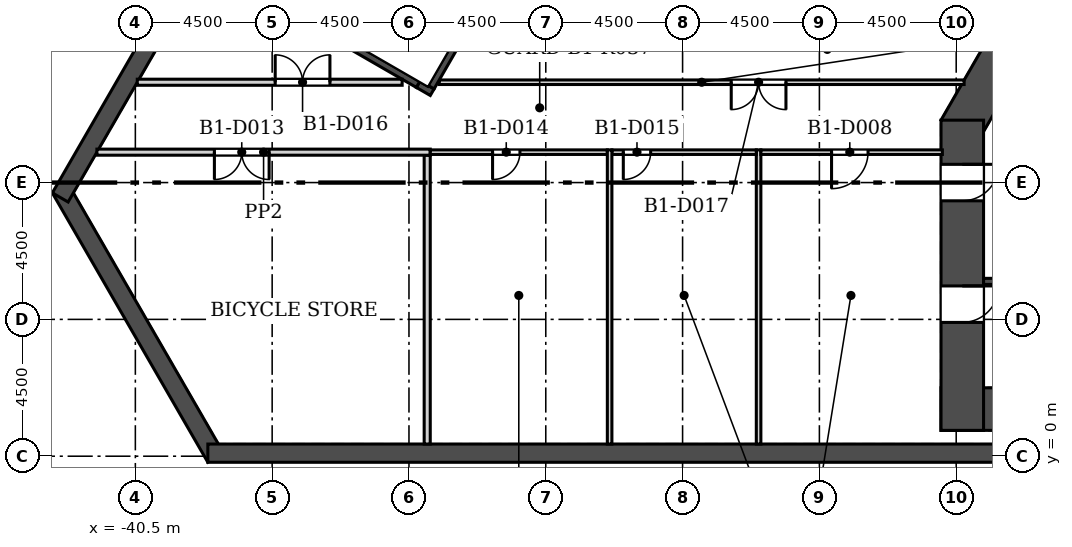
"""IFC4 building model, lengths in metres.
Left out: names, types, materials, properties, quantities, classifications, styles, units other than length and angle.
Written with IfcOpenShell. Run it as: python <this file> out.ifc"""

import sys

from ifc_helpers import new_model, si_unit, direction, frame, frame_2d, origin, place, context, subcontext, project, spatial, rectangle, extrude, element, fill, save


model = new_model("IFC4")
c1 = context("Model", 3, precision=1e-05, world=origin(), true_north=direction((0.0, 1.0)))
c2 = subcontext(c1, "Body", "Model", "MODEL_VIEW")
j1 = project(units=[si_unit("LENGTHUNIT", "METRE"), si_unit("PLANEANGLEUNIT", "RADIAN")], contexts=[c1])
p1 = place(None, origin())
s1 = spatial("IfcSite", under=j1, at=p1, CompositionType="ELEMENT")
p2 = place(p1, origin())
s2 = spatial("IfcBuilding", under=s1, at=p2, CompositionType="ELEMENT")
p3 = place(p2, frame((0.0, 0.0, -8.0)))
s3 = spatial("IfcBuildingStorey", under=s2, at=p3, CompositionType="ELEMENT", Elevation=-8.0)
p4 = place(p3, frame((-42.971, 8.81, 0.0), z_axis=(0.0, 0.0, 1.0), x_axis=(0.499996492717, -0.866027428706, 0.0)))
e1 = element("IfcWall", 1, at=p4, inside=s3, PredefinedType="SOLIDWALL", context=c2, shape_type="SweptSolid", body=[
    extrude(rectangle(XDim=10.231, YDim=0.6, at=frame_2d((5.115, 0.0))), origin(), (0.0, 0.0, 1.0), 7.6),
])
for number, where, z_axis, x_axis in (
    (2, (-38.115, 0.1, 0.0), (0.0, 0.0, 1.0), (1.0, 0.0, 0.0)),
    (3, (-4.856, 74.528, 0.0), (0.0, 0.0, 1.0), (-0.5, -0.866, 0.0)),
):
    element("IfcWall", number, at=place(p3, frame(where, z_axis=z_axis, x_axis=x_axis)), inside=s3, PredefinedType="SOLIDWALL", context=c2, shape_type="SweptSolid", body=[
        extrude(rectangle(XDim=76.231, YDim=0.6, at=frame_2d((38.115, 0.0))), origin(), (0.0, 0.0, 1.0), 7.6),
    ])
p5 = place(p3, frame((-14.0, 1.55, 0.0), z_axis=(0.0, 0.0, 1.0), x_axis=(1.0, 0.0, 0.0)))
e4 = element("IfcWall", 4, at=p5, inside=s3, PredefinedType="SHEAR", context=c2, shape_type="SweptSolid", body=[
    extrude(rectangle(XDim=28.0, YDim=1.4, at=frame_2d((14.0, 0.0))), origin(), (0.0, 0.0, 1.0), 8.0),
])
p6 = place(p3, frame((-8.805, 18.65, 0.0), z_axis=(0.0, 0.0, 1.0), x_axis=(-0.50000187635, -0.866024320471, 0.0)))
e5 = element("IfcWall", 5, at=p6, inside=s3, PredefinedType="SHEAR", context=c2, shape_type="SweptSolid", body=[
    extrude(rectangle(XDim=9.177, YDim=1.4, at=frame_2d((4.588, 0.0))), origin(), (0.0, 0.0, 1.0), 8.0),
])
p7 = place(p3, frame((-13.3, 11.052, 0.0), z_axis=(0.0, 0.0, 1.0), x_axis=(0.0, -1.0, 0.0)))
e6 = element("IfcWall", 6, at=p7, inside=s3, PredefinedType="SHEAR", context=c2, shape_type="SweptSolid", body=[
    extrude(rectangle(XDim=10.202, YDim=1.4, at=frame_2d((5.101, 0.0))), origin(), (0.0, 0.0, 1.0), 8.0),
])
p8 = place(p7, frame((5.453, 0.0, 0.0)))
e7 = element("IfcOpeningElement", 7, at=p8, cuts=e6, PredefinedType="OPENING", context=c2, shape_type="SweptSolid", body=[
    extrude(rectangle(XDim=1.2, YDim=2.1, at=frame_2d((0.6, 1.05))), frame((0.0, 0.71, 0.0), z_axis=(0.0, -1.0, 0.0), x_axis=(1.0, 0.0, 0.0)), (0.0, 0.0, 1.0), 1.42),
])
p9 = place(p7, frame((1.453, 0.0, 0.0)))
e8 = element("IfcOpeningElement", 8, at=p9, cuts=e6, PredefinedType="OPENING", context=c2, shape_type="SweptSolid", body=[
    extrude(rectangle(XDim=1.2, YDim=2.1, at=frame_2d((0.6, 1.05))), frame((0.0, 0.71, 0.0), z_axis=(0.0, -1.0, 0.0), x_axis=(1.0, 0.0, 0.0)), (0.0, 0.0, 1.0), 1.42),
])
p10 = place(p3, frame((-12.6, 5.75, -0.35), z_axis=(0.0, 0.0, 1.0), x_axis=(1.0, 0.0, 0.0)))
e9 = element("IfcWall", 9, at=p10, inside=s3, PredefinedType="SOLIDWALL", context=c2, shape_type="SweptSolid", body=[
    extrude(rectangle(XDim=11.4, YDim=0.2, at=frame_2d((5.7, 0.0))), origin(), (0.0, 0.0, 1.0), 7.95),
])
p11 = place(p3, frame((-20.0, 0.4, 0.0), z_axis=(0.0, 0.0, 1.0), x_axis=(0.0, 1.0, 0.0)))
e10 = element("IfcWall", 10, at=p11, inside=s3, PredefinedType="PARTITIONING", context=c2, shape_type="SweptSolid", body=[
    extrude(rectangle(XDim=9.675, YDim=0.15, at=frame_2d((4.837, 0.0))), origin(), (0.0, 0.0, 1.0), 7.6),
])
p12 = place(p3, frame((-30.9, 9.9, 0.0), z_axis=(0.0, 0.0, 1.0), x_axis=(0.0, -1.0, 0.0)))
e11 = element("IfcWall", 11, at=p12, inside=s3, PredefinedType="PARTITIONING", context=c2, shape_type="SweptSolid", body=[
    extrude(rectangle(XDim=9.5, YDim=0.2, at=frame_2d((4.75, 0.0))), origin(), (0.0, 0.0, 1.0), 7.6),
])
p13 = place(p3, frame((-30.8, 10.0, 0.0), z_axis=(0.0, 0.0, 1.0), x_axis=(-1.0, 0.0, 0.0)))
e12 = element("IfcWall", 12, at=p13, inside=s3, PredefinedType="PARTITIONING", context=c2, shape_type="SweptSolid", body=[
    extrude(rectangle(XDim=10.965, YDim=0.2, at=frame_2d((5.482, 0.0))), origin(), (0.0, 0.0, 1.0), 7.6),
])
p14 = place(p13, frame((5.3, 0.0, 0.0)))
e13 = element("IfcOpeningElement", 13, at=p14, cuts=e12, PredefinedType="OPENING", context=c2, shape_type="SweptSolid", body=[
    extrude(rectangle(XDim=1.8, YDim=2.1, at=frame_2d((0.9, 1.05))), frame((0.0, 0.11, 0.0), z_axis=(0.0, -1.0, 0.0), x_axis=(1.0, 0.0, 0.0)), (0.0, 0.0, 1.0), 0.22),
])
p15 = place(p3, frame((-24.975, 10.0, 0.0), z_axis=(0.0, 0.0, 1.0), x_axis=(-1.0, 0.0, 0.0)))
e14 = element("IfcWall", 14, at=p15, inside=s3, PredefinedType="PARTITIONING", context=c2, shape_type="SweptSolid", body=[
    extrude(rectangle(XDim=5.825, YDim=0.15, at=frame_2d((2.913, 0.0))), origin(), (0.0, 0.0, 1.0), 7.6),
])
p16 = place(p15, frame((2.875, 0.0, 0.0)))
e15 = element("IfcOpeningElement", 15, at=p16, cuts=e14, PredefinedType="OPENING", context=c2, shape_type="SweptSolid", body=[
    extrude(rectangle(XDim=0.9, YDim=2.1, at=frame_2d((0.45, 1.05))), frame((0.0, 0.085, 0.0), z_axis=(0.0, -1.0, 0.0), x_axis=(1.0, 0.0, 0.0)), (0.0, 0.0, 1.0), 0.17),
])
p17 = place(p3, frame((-20.075, 10.0, 0.0), z_axis=(0.0, 0.0, 1.0), x_axis=(-1.0, 0.0, 0.0)))
e16 = element("IfcWall", 16, at=p17, inside=s3, PredefinedType="PARTITIONING", context=c2, shape_type="SweptSolid", body=[
    extrude(rectangle(XDim=4.75, YDim=0.15, at=frame_2d((2.375, 0.0))), origin(), (0.0, 0.0, 1.0), 7.6),
])
p18 = place(p17, frame((3.475, 0.0, 0.0)))
e17 = element("IfcOpeningElement", 17, at=p18, cuts=e16, PredefinedType="OPENING", context=c2, shape_type="SweptSolid", body=[
    extrude(rectangle(XDim=0.9, YDim=2.1, at=frame_2d((0.45, 1.05))), frame((0.0, 0.085, 0.0), z_axis=(0.0, -1.0, 0.0), x_axis=(1.0, 0.0, 0.0)), (0.0, 0.0, 1.0), 0.17),
])
p19 = place(p3, frame((-19.925, 10.0, 0.0), z_axis=(0.0, 0.0, 1.0), x_axis=(1.0, 0.0, 0.0)))
e18 = element("IfcWall", 18, at=p19, inside=s3, PredefinedType="PARTITIONING", context=c2, shape_type="SweptSolid", body=[
    extrude(rectangle(XDim=5.97, YDim=0.15, at=frame_2d((2.985, 0.0))), origin(), (0.0, 0.0, 1.0), 7.6),
])
p20 = place(p19, frame((2.325, 0.0, 0.0)))
e19 = element("IfcOpeningElement", 19, at=p20, cuts=e18, PredefinedType="OPENING", context=c2, shape_type="SweptSolid", body=[
    extrude(rectangle(XDim=1.2, YDim=2.1, at=frame_2d((0.6, 1.05))), frame((0.0, 0.085, 0.0), z_axis=(0.0, -1.0, 0.0), x_axis=(1.0, 0.0, 0.0)), (0.0, 0.0, 1.0), 0.17),
])
p21 = place(p3, frame((-24.9, 10.075, 0.0), z_axis=(0.0, 0.0, 1.0), x_axis=(0.0, -1.0, 0.0)))
e20 = element("IfcWall", 20, at=p21, inside=s3, PredefinedType="PARTITIONING", context=c2, shape_type="SweptSolid", body=[
    extrude(rectangle(XDim=9.675, YDim=0.15, at=frame_2d((4.837, 0.0))), origin(), (0.0, 0.0, 1.0), 7.6),
])
p22 = place(p3, frame((-30.736, 11.972, 0.0), z_axis=(0.0, 0.0, 1.0), x_axis=(-0.866139611167, 0.499802134818, 0.0)))
e21 = element("IfcWall", 21, at=p22, inside=s3, PredefinedType="SOLIDWALL", context=c2, shape_type="SweptSolid", body=[
    extrude(rectangle(XDim=0.531, YDim=0.25, at=frame_2d((0.265, 0.0))), origin(), (0.0, 0.0, 1.0), 7.6),
])
p23 = place(p3, frame((-31.196, 12.238, 0.0), z_axis=(0.0, 0.0, 1.0), x_axis=(-0.866033115271, 0.499986643076, 0.0)))
e22 = element("IfcWall", 22, at=p23, inside=s3, PredefinedType="SOLIDWALL", context=c2, shape_type="SweptSolid", body=[
    extrude(rectangle(XDim=6.32, YDim=0.25, at=frame_2d((3.16, 0.0))), origin(), (0.0, 0.0, 1.0), 7.6),
])
p24 = place(p3, frame((-40.437, 12.3, 0.0), z_axis=(0.0, 0.0, 1.0), x_axis=(1.0, 0.0, 0.0)))
e23 = element("IfcWall", 23, at=p24, inside=s3, PredefinedType="PARTITIONING", context=c2, shape_type="SweptSolid", body=[
    extrude(rectangle(XDim=8.713, YDim=0.2, at=frame_2d((4.356, 0.0))), origin(), (0.0, 0.0, 1.0), 7.6),
])
p25 = place(p24, frame((4.537, 0.0, 0.0)))
e24 = element("IfcOpeningElement", 24, at=p25, cuts=e23, PredefinedType="OPENING", context=c2, shape_type="SweptSolid", body=[
    extrude(rectangle(XDim=1.8, YDim=2.1, at=frame_2d((0.9, 1.05))), frame((0.0, 0.11, 0.0), z_axis=(0.0, -1.0, 0.0), x_axis=(1.0, 0.0, 0.0)), (0.0, 0.0, 1.0), 0.22),
])
p26 = place(p3, frame((-30.502, 12.3, 0.0), z_axis=(0.0, 0.0, 1.0), x_axis=(1.0, 0.0, 0.0)))
e25 = element("IfcWall", 25, at=p26, inside=s3, PredefinedType="PARTITIONING", context=c2, shape_type="SweptSolid", body=[
    extrude(rectangle(XDim=17.263, YDim=0.15, at=frame_2d((8.631, 0.0))), origin(), (0.0, 0.0, 1.0), 7.6),
])
p27 = place(p26, frame((9.602, 0.0, 0.0)))
e26 = element("IfcOpeningElement", 26, at=p27, cuts=e25, PredefinedType="OPENING", context=c2, shape_type="SweptSolid", body=[
    extrude(rectangle(XDim=1.8, YDim=2.1, at=frame_2d((0.9, 1.05))), frame((0.0, 0.085, 0.0), z_axis=(0.0, -1.0, 0.0), x_axis=(1.0, 0.0, 0.0)), (0.0, 0.0, 1.0), 0.17),
])
p28 = place(p3, frame((-27.132, 18.465, 0.0), z_axis=(0.0, 0.0, 1.0), x_axis=(-0.499977226672, -0.866038551572, 0.0)))
e27 = element("IfcWall", 27, at=p28, inside=s3, PredefinedType="SOLIDWALL", context=c2, shape_type="SweptSolid", body=[
    extrude(rectangle(XDim=7.3, YDim=0.25, at=frame_2d((3.65, 0.0))), origin(), (0.0, 0.0, 1.0), 7.6),
])
p29 = place(p8, origin())
e28 = element("IfcDoor", 28, at=p29, inside=s3, OperationType="SINGLE_SWING_LEFT", PredefinedType="DOOR", context=c2, shape_type="SweptSolid", body=[
    extrude(rectangle(XDim=1.2, YDim=2.1, at=frame_2d((0.6, 1.05))), frame((0.0, 0.025, 0.0), z_axis=(0.0, -1.0, 0.0), x_axis=(1.0, 0.0, 0.0)), (0.0, 0.0, 1.0), 0.05),
])
fill(e7, e28)
p30 = place(p9, origin())
e29 = element("IfcDoor", 29, at=p30, inside=s3, OperationType="SINGLE_SWING_LEFT", PredefinedType="DOOR", context=c2, shape_type="SweptSolid", body=[
    extrude(rectangle(XDim=1.2, YDim=2.1, at=frame_2d((0.6, 1.05))), frame((0.0, 0.025, 0.0), z_axis=(0.0, -1.0, 0.0), x_axis=(1.0, 0.0, 0.0)), (0.0, 0.0, 1.0), 0.05),
])
fill(e8, e29)
p31 = place(p20, frame((1.2, 0.0, 0.0), z_axis=(0.0, 0.0, 1.0), x_axis=(-1.0, 0.0, 0.0)))
e30 = element("IfcDoor", 30, at=p31, inside=s3, OperationType="SINGLE_SWING_RIGHT", PredefinedType="DOOR", context=c2, shape_type="SweptSolid", body=[
    extrude(rectangle(XDim=1.2, YDim=2.1, at=frame_2d((0.6, 1.05))), frame((0.0, 0.025, 0.0), z_axis=(0.0, -1.0, 0.0), x_axis=(1.0, 0.0, 0.0)), (0.0, 0.0, 1.0), 0.05),
])
fill(e19, e30)
p32 = place(p14, origin())
e31 = element("IfcDoor", 31, at=p32, inside=s3, OperationType="DOUBLE_DOOR_SINGLE_SWING", PredefinedType="DOOR", context=c2, shape_type="SweptSolid", body=[
    extrude(rectangle(XDim=1.8, YDim=2.1, at=frame_2d((0.9, 1.05))), frame((0.0, 0.025, 0.0), z_axis=(0.0, -1.0, 0.0), x_axis=(1.0, 0.0, 0.0)), (0.0, 0.0, 1.0), 0.05),
])
fill(e13, e31)
p33 = place(p16, origin())
e32 = element("IfcDoor", 32, at=p33, inside=s3, OperationType="SINGLE_SWING_RIGHT", PredefinedType="DOOR", context=c2, shape_type="SweptSolid", body=[
    extrude(rectangle(XDim=0.9, YDim=2.1, at=frame_2d((0.45, 1.05))), frame((0.0, 0.025, 0.0), z_axis=(0.0, -1.0, 0.0), x_axis=(1.0, 0.0, 0.0)), (0.0, 0.0, 1.0), 0.05),
])
fill(e15, e32)
p34 = place(p18, origin())
e33 = element("IfcDoor", 33, at=p34, inside=s3, OperationType="SINGLE_SWING_RIGHT", PredefinedType="DOOR", context=c2, shape_type="SweptSolid", body=[
    extrude(rectangle(XDim=0.9, YDim=2.1, at=frame_2d((0.45, 1.05))), frame((0.0, 0.025, 0.0), z_axis=(0.0, -1.0, 0.0), x_axis=(1.0, 0.0, 0.0)), (0.0, 0.0, 1.0), 0.05),
])
fill(e17, e33)
p35 = place(p25, origin())
e34 = element("IfcDoor", 34, at=p35, inside=s3, OperationType="DOUBLE_DOOR_SINGLE_SWING", PredefinedType="DOOR", context=c2, shape_type="SweptSolid", body=[
    extrude(rectangle(XDim=1.8, YDim=2.1, at=frame_2d((0.9, 1.05))), frame((0.0, 0.025, 0.0), z_axis=(0.0, -1.0, 0.0), x_axis=(1.0, 0.0, 0.0)), (0.0, 0.0, 1.0), 0.05),
])
fill(e24, e34)
p36 = place(p27, frame((1.8, 0.0, 0.0), z_axis=(0.0, 0.0, 1.0), x_axis=(-1.0, 0.0, 0.0)))
e35 = element("IfcDoor", 35, at=p36, inside=s3, OperationType="DOUBLE_DOOR_SINGLE_SWING", PredefinedType="DOOR", context=c2, shape_type="SweptSolid", body=[
    extrude(rectangle(XDim=1.8, YDim=2.1, at=frame_2d((0.9, 1.05))), frame((0.0, 0.025, 0.0), z_axis=(0.0, -1.0, 0.0), x_axis=(1.0, 0.0, 0.0)), (0.0, 0.0, 1.0), 0.05),
])
fill(e26, e35)
save(model, sys.argv[1])
